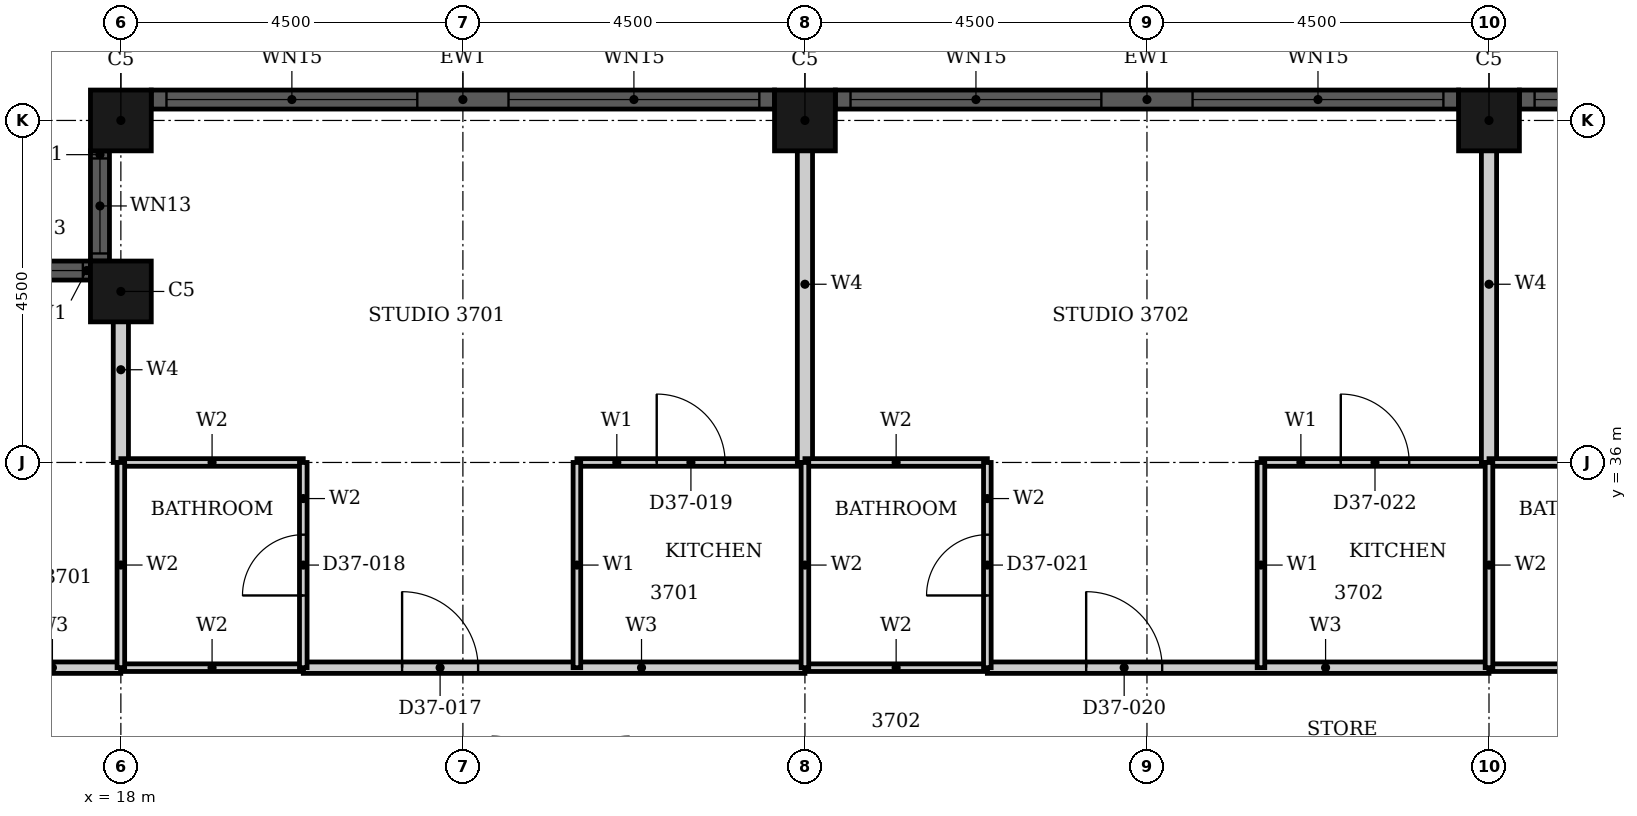
"""IFC4 building model, lengths in metres.
Left out: names, types, materials, properties, quantities, classifications, styles, units other than length and angle.
Written with IfcOpenShell. Run it as: python <this file> out.ifc"""

import sys

from ifc_helpers import new_model, si_unit, direction, frame, frame_2d, origin, origin_2d, place, context, subcontext, project, spatial, rectangle, hollow_rectangle, extrude, element, fill, save


model = new_model("IFC4")
c1 = context("Model", 3, precision=1e-05, world=origin(), true_north=direction((0.0, 1.0)))
c2 = subcontext(c1, "Body", "Model", "MODEL_VIEW")
j1 = project(units=[si_unit("LENGTHUNIT", "METRE"), si_unit("PLANEANGLEUNIT", "RADIAN")], contexts=[c1])
p1 = place(None, origin())
s1 = spatial("IfcSite", under=j1, at=p1, CompositionType="ELEMENT")
p2 = place(p1, origin())
s2 = spatial("IfcBuilding", under=s1, at=p2, CompositionType="ELEMENT")
p3 = place(p2, frame((0.0, 0.0, 150.6)))
s3 = spatial("IfcBuildingStorey", under=s2, at=p3, CompositionType="ELEMENT", Elevation=150.6)
for number, where, z_axis, x_axis in (
    (1, (36.0, 40.5, 0.0), (0.0, 0.0, 1.0), (1.0, 0.0, 0.0)),
    (2, (27.0, 40.5, 0.0), (0.0, 0.0, 1.0), (1.0, 0.0, 0.0)),
    (3, (18.0, 40.5, 0.0), (0.0, 0.0, 1.0), (1.0, 0.0, 0.0)),
    (4, (18.0, 38.25, 0.0), (0.0, 0.0, 1.0), (1.0, 0.0, 0.0)),
):
    element("IfcColumn", number, at=place(p3, frame(where, z_axis=z_axis, x_axis=x_axis)), inside=s3, PredefinedType="COLUMN", context=c2, shape_type="SweptSolid", body=[
        extrude(hollow_rectangle(XDim=0.8, YDim=0.8, WallThickness=0.025, at=origin_2d()), origin(), (0.0, 0.0, 1.0), 3.7),
    ])
p4 = place(p3, frame((44.6, 40.775, 0.0), z_axis=(0.0, 0.0, 1.0), x_axis=(-1.0, 0.0, 0.0)))
e5 = element("IfcWall", 5, at=p4, inside=s3, PredefinedType="SOLIDWALL", context=c2, shape_type="SweptSolid", body=[
    extrude(rectangle(XDim=8.2, YDim=0.25, at=frame_2d((4.1, 0.0))), origin(), (0.0, 0.0, 1.0), 3.7),
])
p5 = place(p4, frame((0.2, 0.0, 0.45)))
e6 = element("IfcOpeningElement", 6, at=p5, cuts=e5, PredefinedType="OPENING", context=c2, shape_type="SweptSolid", body=[
    extrude(rectangle(XDim=3.3, YDim=2.3, at=frame_2d((1.65, 1.15))), frame((0.0, 0.135, 0.0), z_axis=(0.0, -1.0, 0.0), x_axis=(1.0, 0.0, 0.0)), (0.0, 0.0, 1.0), 0.27),
])
p6 = place(p4, frame((4.7, 0.0, 0.45)))
e7 = element("IfcOpeningElement", 7, at=p6, cuts=e5, PredefinedType="OPENING", context=c2, shape_type="SweptSolid", body=[
    extrude(rectangle(XDim=3.3, YDim=2.3, at=frame_2d((1.65, 1.15))), frame((0.0, 0.135, 0.0), z_axis=(0.0, -1.0, 0.0), x_axis=(1.0, 0.0, 0.0)), (0.0, 0.0, 1.0), 0.27),
])
p7 = place(p3, frame((35.6, 40.775, 0.0), z_axis=(0.0, 0.0, 1.0), x_axis=(-1.0, 0.0, 0.0)))
e8 = element("IfcWall", 8, at=p7, inside=s3, PredefinedType="SOLIDWALL", context=c2, shape_type="SweptSolid", body=[
    extrude(rectangle(XDim=8.2, YDim=0.25, at=frame_2d((4.1, 0.0))), origin(), (0.0, 0.0, 1.0), 3.7),
])
p8 = place(p7, frame((0.2, 0.0, 0.45)))
e9 = element("IfcOpeningElement", 9, at=p8, cuts=e8, PredefinedType="OPENING", context=c2, shape_type="SweptSolid", body=[
    extrude(rectangle(XDim=3.3, YDim=2.3, at=frame_2d((1.65, 1.15))), frame((0.0, 0.135, 0.0), z_axis=(0.0, -1.0, 0.0), x_axis=(1.0, 0.0, 0.0)), (0.0, 0.0, 1.0), 0.27),
])
p9 = place(p7, frame((4.7, 0.0, 0.45)))
e10 = element("IfcOpeningElement", 10, at=p9, cuts=e8, PredefinedType="OPENING", context=c2, shape_type="SweptSolid", body=[
    extrude(rectangle(XDim=3.3, YDim=2.3, at=frame_2d((1.65, 1.15))), frame((0.0, 0.135, 0.0), z_axis=(0.0, -1.0, 0.0), x_axis=(1.0, 0.0, 0.0)), (0.0, 0.0, 1.0), 0.27),
])
p10 = place(p3, frame((26.6, 40.775, 0.0), z_axis=(0.0, 0.0, 1.0), x_axis=(-1.0, 0.0, 0.0)))
e11 = element("IfcWall", 11, at=p10, inside=s3, PredefinedType="SOLIDWALL", context=c2, shape_type="SweptSolid", body=[
    extrude(rectangle(XDim=8.2, YDim=0.25, at=frame_2d((4.1, 0.0))), origin(), (0.0, 0.0, 1.0), 3.7),
])
p11 = place(p10, frame((0.2, 0.0, 0.45)))
e12 = element("IfcOpeningElement", 12, at=p11, cuts=e11, PredefinedType="OPENING", context=c2, shape_type="SweptSolid", body=[
    extrude(rectangle(XDim=3.3, YDim=2.3, at=frame_2d((1.65, 1.15))), frame((0.0, 0.135, 0.0), z_axis=(0.0, -1.0, 0.0), x_axis=(1.0, 0.0, 0.0)), (0.0, 0.0, 1.0), 0.27),
])
p12 = place(p10, frame((4.7, 0.0, 0.45)))
e13 = element("IfcOpeningElement", 13, at=p12, cuts=e11, PredefinedType="OPENING", context=c2, shape_type="SweptSolid", body=[
    extrude(rectangle(XDim=3.3, YDim=2.3, at=frame_2d((1.65, 1.15))), frame((0.0, 0.135, 0.0), z_axis=(0.0, -1.0, 0.0), x_axis=(1.0, 0.0, 0.0)), (0.0, 0.0, 1.0), 0.27),
])
p13 = place(p3, frame((17.725, 40.1, 0.0), z_axis=(0.0, 0.0, 1.0), x_axis=(0.0, -1.0, 0.0)))
e14 = element("IfcWall", 14, at=p13, inside=s3, PredefinedType="SOLIDWALL", context=c2, shape_type="SweptSolid", body=[
    extrude(rectangle(XDim=1.45, YDim=0.25, at=frame_2d((0.725, 0.0))), origin(), (0.0, 0.0, 1.0), 3.7),
])
p14 = place(p13, frame((0.1, 0.0, 0.9)))
e15 = element("IfcOpeningElement", 15, at=p14, cuts=e14, PredefinedType="OPENING", context=c2, shape_type="SweptSolid", body=[
    extrude(rectangle(XDim=1.25, YDim=1.85, at=frame_2d((0.625, 0.925))), frame((0.0, 0.135, 0.0), z_axis=(0.0, -1.0, 0.0), x_axis=(1.0, 0.0, 0.0)), (0.0, 0.0, 1.0), 0.27),
])
p15 = place(p3, frame((17.6, 38.525, 0.0), z_axis=(0.0, 0.0, 1.0), x_axis=(-1.0, 0.0, 0.0)))
e16 = element("IfcWall", 16, at=p15, inside=s3, PredefinedType="SOLIDWALL", context=c2, shape_type="SweptSolid", body=[
    extrude(rectangle(XDim=1.45, YDim=0.25, at=frame_2d((0.725, 0.0))), origin(), (0.0, 0.0, 1.0), 3.7),
])
p16 = place(p15, frame((0.1, 0.0, 0.9)))
e17 = element("IfcOpeningElement", 17, at=p16, cuts=e16, PredefinedType="OPENING", context=c2, shape_type="SweptSolid", body=[
    extrude(rectangle(XDim=1.25, YDim=1.85, at=frame_2d((0.625, 0.925))), frame((0.0, 0.135, 0.0), z_axis=(0.0, -1.0, 0.0), x_axis=(1.0, 0.0, 0.0)), (0.0, 0.0, 1.0), 0.27),
])
p17 = place(p3, frame((20.4, 33.3, 0.0), z_axis=(0.0, 0.0, 1.0), x_axis=(1.0, 0.0, 0.0)))
e18 = element("IfcWall", 18, at=p17, inside=s3, PredefinedType="PARTITIONING", context=c2, shape_type="SweptSolid", body=[
    extrude(rectangle(XDim=6.6, YDim=0.15, at=frame_2d((3.3, 0.0))), origin(), (0.0, 0.0, 1.0), 3.4),
])
p18 = place(p17, frame((1.3, 0.0, 0.0)))
e19 = element("IfcOpeningElement", 19, at=p18, cuts=e18, PredefinedType="OPENING", context=c2, shape_type="SweptSolid", body=[
    extrude(rectangle(XDim=1.0, YDim=2.2, at=frame_2d((0.5, 1.1))), frame((0.0, 0.085, 0.0), z_axis=(0.0, -1.0, 0.0), x_axis=(1.0, 0.0, 0.0)), (0.0, 0.0, 1.0), 0.17),
])
p19 = place(p3, frame((29.4, 33.3, 0.0), z_axis=(0.0, 0.0, 1.0), x_axis=(1.0, 0.0, 0.0)))
e20 = element("IfcWall", 20, at=p19, inside=s3, PredefinedType="PARTITIONING", context=c2, shape_type="SweptSolid", body=[
    extrude(rectangle(XDim=6.6, YDim=0.15, at=frame_2d((3.3, 0.0))), origin(), (0.0, 0.0, 1.0), 3.4),
])
p20 = place(p19, frame((1.3, 0.0, 0.0)))
e21 = element("IfcOpeningElement", 21, at=p20, cuts=e20, PredefinedType="OPENING", context=c2, shape_type="SweptSolid", body=[
    extrude(rectangle(XDim=1.0, YDim=2.2, at=frame_2d((0.5, 1.1))), frame((0.0, 0.085, 0.0), z_axis=(0.0, -1.0, 0.0), x_axis=(1.0, 0.0, 0.0)), (0.0, 0.0, 1.0), 0.17),
])
p21 = place(p3, frame((16.2, 33.3, 0.0), z_axis=(0.0, 0.0, 1.0), x_axis=(1.0, 0.0, 0.0)))
e22 = element("IfcWall", 22, at=p21, inside=s3, PredefinedType="PARTITIONING", context=c2, shape_type="SweptSolid", body=[
    extrude(rectangle(XDim=1.799, YDim=0.15, at=frame_2d((0.899, 0.0))), origin(), (0.0, 0.0, 1.0), 3.4),
])
p22 = place(p3, frame((24.0, 36.0, 0.0), z_axis=(0.0, 0.0, 1.0), x_axis=(1.0, 0.0, 0.0)))
e23 = element("IfcWall", 23, at=p22, inside=s3, PredefinedType="PARTITIONING", context=c2, shape_type="SweptSolid", body=[
    extrude(rectangle(XDim=3.0, YDim=0.1, at=frame_2d((1.5, 0.0))), origin(), (0.0, 0.0, 1.0), 3.4),
])
p23 = place(p22, frame((1.05, 0.0, 0.0)))
e24 = element("IfcOpeningElement", 24, at=p23, cuts=e23, PredefinedType="OPENING", context=c2, shape_type="SweptSolid", body=[
    extrude(rectangle(XDim=0.9, YDim=2.1, at=frame_2d((0.45, 1.05))), frame((0.0, 0.06, 0.0), z_axis=(0.0, -1.0, 0.0), x_axis=(1.0, 0.0, 0.0)), (0.0, 0.0, 1.0), 0.12),
])
p24 = place(p3, frame((33.0, 36.0, 0.0), z_axis=(0.0, 0.0, 1.0), x_axis=(1.0, 0.0, 0.0)))
e25 = element("IfcWall", 25, at=p24, inside=s3, PredefinedType="PARTITIONING", context=c2, shape_type="SweptSolid", body=[
    extrude(rectangle(XDim=3.0, YDim=0.1, at=frame_2d((1.5, 0.0))), origin(), (0.0, 0.0, 1.0), 3.4),
])
p25 = place(p24, frame((1.05, 0.0, 0.0)))
e26 = element("IfcOpeningElement", 26, at=p25, cuts=e25, PredefinedType="OPENING", context=c2, shape_type="SweptSolid", body=[
    extrude(rectangle(XDim=0.9, YDim=2.1, at=frame_2d((0.45, 1.05))), frame((0.0, 0.06, 0.0), z_axis=(0.0, -1.0, 0.0), x_axis=(1.0, 0.0, 0.0)), (0.0, 0.0, 1.0), 0.12),
])
for number, where, z_axis, x_axis in (
    (27, (24.0, 33.3, 0.0), (0.0, 0.0, 1.0), (0.0, 1.0, 0.0)),
    (28, (33.0, 33.3, 0.0), (0.0, 0.0, 1.0), (0.0, 1.0, 0.0)),
):
    element("IfcWall", number, at=place(p3, frame(where, z_axis=z_axis, x_axis=x_axis)), inside=s3, PredefinedType="PARTITIONING", context=c2, shape_type="SweptSolid", body=[
        extrude(rectangle(XDim=2.7, YDim=0.1, at=frame_2d((1.35, 0.0))), origin(), (0.0, 0.0, 1.0), 3.4),
    ])
p26 = place(p3, frame((18.0, 36.0, 0.0), z_axis=(0.0, 0.0, 1.0), x_axis=(0.0, 1.0, 0.0)))
e29 = element("IfcWall", 29, at=p26, inside=s3, PredefinedType="PARTITIONING", context=c2, shape_type="SweptSolid", body=[
    extrude(rectangle(XDim=2.44, YDim=0.2, at=frame_2d((1.22, 0.0))), origin(), (0.0, 0.0, 1.0), 3.4),
])
for number, where, z_axis, x_axis in (
    (30, (27.0, 36.0, 0.0), (0.0, 0.0, 1.0), (0.0, 1.0, 0.0)),
    (31, (36.0, 36.0, 0.0), (0.0, 0.0, 1.0), (0.0, 1.0, 0.0)),
):
    element("IfcWall", number, at=place(p3, frame(where, z_axis=z_axis, x_axis=x_axis)), inside=s3, PredefinedType="PARTITIONING", context=c2, shape_type="SweptSolid", body=[
        extrude(rectangle(XDim=4.69, YDim=0.2, at=frame_2d((2.345, 0.0))), origin(), (0.0, 0.0, 1.0), 3.4),
    ])
for number, where, z_axis, x_axis in (
    (32, (18.0, 33.3, 0.0), (0.0, 0.0, 1.0), (1.0, 0.0, 0.0)),
    (33, (27.0, 33.3, 0.0), (0.0, 0.0, 1.0), (1.0, 0.0, 0.0)),
    (34, (36.0, 33.3, 0.0), (0.0, 0.0, 1.0), (1.0, 0.0, 0.0)),
    (35, (18.0, 36.0, 0.0), (0.0, 0.0, 1.0), (1.0, 0.0, 0.0)),
    (36, (27.0, 36.0, 0.0), (0.0, 0.0, 1.0), (1.0, 0.0, 0.0)),
    (37, (36.0, 36.0, 0.0), (0.0, 0.0, 1.0), (1.0, 0.0, 0.0)),
):
    element("IfcWall", number, at=place(p3, frame(where, z_axis=z_axis, x_axis=x_axis)), inside=s3, PredefinedType="PARTITIONING", context=c2, shape_type="SweptSolid", body=[
        extrude(rectangle(XDim=2.4, YDim=0.1, at=frame_2d((1.2, 0.0))), origin(), (0.0, 0.0, 1.0), 3.4),
    ])
p27 = place(p3, frame((18.0, 33.301, 0.0), z_axis=(0.0, 0.0, 1.0), x_axis=(0.0, 1.0, 0.0)))
e38 = element("IfcWall", 38, at=p27, inside=s3, PredefinedType="PARTITIONING", context=c2, shape_type="SweptSolid", body=[
    extrude(rectangle(XDim=2.699, YDim=0.1, at=frame_2d((1.35, 0.0))), origin(), (0.0, 0.0, 1.0), 3.4),
])
p28 = place(p3, frame((20.4, 33.3, 0.0), z_axis=(0.0, 0.0, 1.0), x_axis=(0.0, 1.0, 0.0)))
e39 = element("IfcWall", 39, at=p28, inside=s3, PredefinedType="PARTITIONING", context=c2, shape_type="SweptSolid", body=[
    extrude(rectangle(XDim=2.7, YDim=0.1, at=frame_2d((1.35, 0.0))), origin(), (0.0, 0.0, 1.0), 3.4),
])
p29 = place(p28, frame((0.95, 0.0, 0.0)))
e40 = element("IfcOpeningElement", 40, at=p29, cuts=e39, PredefinedType="OPENING", context=c2, shape_type="SweptSolid", body=[
    extrude(rectangle(XDim=0.8, YDim=2.1, at=frame_2d((0.4, 1.05))), frame((0.0, 0.06, 0.0), z_axis=(0.0, -1.0, 0.0), x_axis=(1.0, 0.0, 0.0)), (0.0, 0.0, 1.0), 0.12),
])
p30 = place(p3, frame((27.0, 33.3, 0.0), z_axis=(0.0, 0.0, 1.0), x_axis=(0.0, 1.0, 0.0)))
e41 = element("IfcWall", 41, at=p30, inside=s3, PredefinedType="PARTITIONING", context=c2, shape_type="SweptSolid", body=[
    extrude(rectangle(XDim=2.7, YDim=0.1, at=frame_2d((1.35, 0.0))), origin(), (0.0, 0.0, 1.0), 3.4),
])
p31 = place(p3, frame((29.4, 33.3, 0.0), z_axis=(0.0, 0.0, 1.0), x_axis=(0.0, 1.0, 0.0)))
e42 = element("IfcWall", 42, at=p31, inside=s3, PredefinedType="PARTITIONING", context=c2, shape_type="SweptSolid", body=[
    extrude(rectangle(XDim=2.7, YDim=0.1, at=frame_2d((1.35, 0.0))), origin(), (0.0, 0.0, 1.0), 3.4),
])
p32 = place(p31, frame((0.95, 0.0, 0.0)))
e43 = element("IfcOpeningElement", 43, at=p32, cuts=e42, PredefinedType="OPENING", context=c2, shape_type="SweptSolid", body=[
    extrude(rectangle(XDim=0.8, YDim=2.1, at=frame_2d((0.4, 1.05))), frame((0.0, 0.06, 0.0), z_axis=(0.0, -1.0, 0.0), x_axis=(1.0, 0.0, 0.0)), (0.0, 0.0, 1.0), 0.12),
])
p33 = place(p3, frame((36.0, 33.3, 0.0), z_axis=(0.0, 0.0, 1.0), x_axis=(0.0, 1.0, 0.0)))
e44 = element("IfcWall", 44, at=p33, inside=s3, PredefinedType="PARTITIONING", context=c2, shape_type="SweptSolid", body=[
    extrude(rectangle(XDim=2.7, YDim=0.1, at=frame_2d((1.35, 0.0))), origin(), (0.0, 0.0, 1.0), 3.4),
])
p34 = place(p6, origin())
e45 = element("IfcWindow", 45, at=p34, inside=s3, PartitioningType="SINGLE_PANEL", PredefinedType="WINDOW", context=c2, shape_type="SweptSolid", body=[
    extrude(rectangle(XDim=3.3, YDim=2.3, at=frame_2d((1.65, 1.15))), frame((0.0, 0.03, 0.0), z_axis=(0.0, -1.0, 0.0), x_axis=(1.0, 0.0, 0.0)), (0.0, 0.0, 1.0), 0.06),
])
fill(e7, e45)
p35 = place(p8, origin())
e46 = element("IfcWindow", 46, at=p35, inside=s3, PartitioningType="SINGLE_PANEL", PredefinedType="WINDOW", context=c2, shape_type="SweptSolid", body=[
    extrude(rectangle(XDim=3.3, YDim=2.3, at=frame_2d((1.65, 1.15))), frame((0.0, 0.03, 0.0), z_axis=(0.0, -1.0, 0.0), x_axis=(1.0, 0.0, 0.0)), (0.0, 0.0, 1.0), 0.06),
])
fill(e9, e46)
p36 = place(p9, origin())
e47 = element("IfcWindow", 47, at=p36, inside=s3, PartitioningType="SINGLE_PANEL", PredefinedType="WINDOW", context=c2, shape_type="SweptSolid", body=[
    extrude(rectangle(XDim=3.3, YDim=2.3, at=frame_2d((1.65, 1.15))), frame((0.0, 0.03, 0.0), z_axis=(0.0, -1.0, 0.0), x_axis=(1.0, 0.0, 0.0)), (0.0, 0.0, 1.0), 0.06),
])
fill(e10, e47)
p37 = place(p11, origin())
e48 = element("IfcWindow", 48, at=p37, inside=s3, PartitioningType="SINGLE_PANEL", PredefinedType="WINDOW", context=c2, shape_type="SweptSolid", body=[
    extrude(rectangle(XDim=3.3, YDim=2.3, at=frame_2d((1.65, 1.15))), frame((0.0, 0.03, 0.0), z_axis=(0.0, -1.0, 0.0), x_axis=(1.0, 0.0, 0.0)), (0.0, 0.0, 1.0), 0.06),
])
fill(e12, e48)
p38 = place(p12, origin())
e49 = element("IfcWindow", 49, at=p38, inside=s3, PartitioningType="SINGLE_PANEL", PredefinedType="WINDOW", context=c2, shape_type="SweptSolid", body=[
    extrude(rectangle(XDim=3.3, YDim=2.3, at=frame_2d((1.65, 1.15))), frame((0.0, 0.03, 0.0), z_axis=(0.0, -1.0, 0.0), x_axis=(1.0, 0.0, 0.0)), (0.0, 0.0, 1.0), 0.06),
])
fill(e13, e49)
p39 = place(p14, origin())
e50 = element("IfcWindow", 50, at=p39, inside=s3, PartitioningType="SINGLE_PANEL", PredefinedType="WINDOW", context=c2, shape_type="SweptSolid", body=[
    extrude(rectangle(XDim=1.25, YDim=1.85, at=frame_2d((0.625, 0.925))), frame((0.0, 0.03, 0.0), z_axis=(0.0, -1.0, 0.0), x_axis=(1.0, 0.0, 0.0)), (0.0, 0.0, 1.0), 0.06),
])
fill(e15, e50)
p40 = place(p16, origin())
e51 = element("IfcWindow", 51, at=p40, inside=s3, PartitioningType="SINGLE_PANEL", PredefinedType="WINDOW", context=c2, shape_type="SweptSolid", body=[
    extrude(rectangle(XDim=1.25, YDim=1.85, at=frame_2d((0.625, 0.925))), frame((0.0, 0.03, 0.0), z_axis=(0.0, -1.0, 0.0), x_axis=(1.0, 0.0, 0.0)), (0.0, 0.0, 1.0), 0.06),
])
fill(e17, e51)
p41 = place(p18, origin())
e52 = element("IfcDoor", 52, at=p41, inside=s3, OperationType="SINGLE_SWING_LEFT", PredefinedType="DOOR", context=c2, shape_type="SweptSolid", body=[
    extrude(rectangle(XDim=1.0, YDim=2.2, at=frame_2d((0.5, 1.1))), frame((0.0, 0.025, 0.0), z_axis=(0.0, -1.0, 0.0), x_axis=(1.0, 0.0, 0.0)), (0.0, 0.0, 1.0), 0.05),
])
fill(e19, e52)
p42 = place(p29, origin())
e53 = element("IfcDoor", 53, at=p42, inside=s3, OperationType="SINGLE_SWING_LEFT", PredefinedType="DOOR", context=c2, shape_type="SweptSolid", body=[
    extrude(rectangle(XDim=0.8, YDim=2.1, at=frame_2d((0.4, 1.05))), frame((0.0, 0.025, 0.0), z_axis=(0.0, -1.0, 0.0), x_axis=(1.0, 0.0, 0.0)), (0.0, 0.0, 1.0), 0.05),
])
fill(e40, e53)
p43 = place(p23, origin())
e54 = element("IfcDoor", 54, at=p43, inside=s3, OperationType="SINGLE_SWING_LEFT", PredefinedType="DOOR", context=c2, shape_type="SweptSolid", body=[
    extrude(rectangle(XDim=0.9, YDim=2.1, at=frame_2d((0.45, 1.05))), frame((0.0, 0.025, 0.0), z_axis=(0.0, -1.0, 0.0), x_axis=(1.0, 0.0, 0.0)), (0.0, 0.0, 1.0), 0.05),
])
fill(e24, e54)
p44 = place(p20, origin())
e55 = element("IfcDoor", 55, at=p44, inside=s3, OperationType="SINGLE_SWING_LEFT", PredefinedType="DOOR", context=c2, shape_type="SweptSolid", body=[
    extrude(rectangle(XDim=1.0, YDim=2.2, at=frame_2d((0.5, 1.1))), frame((0.0, 0.025, 0.0), z_axis=(0.0, -1.0, 0.0), x_axis=(1.0, 0.0, 0.0)), (0.0, 0.0, 1.0), 0.05),
])
fill(e21, e55)
p45 = place(p32, origin())
e56 = element("IfcDoor", 56, at=p45, inside=s3, OperationType="SINGLE_SWING_RIGHT", PredefinedType="DOOR", context=c2, shape_type="SweptSolid", body=[
    extrude(rectangle(XDim=0.8, YDim=2.1, at=frame_2d((0.4, 1.05))), frame((0.0, 0.025, 0.0), z_axis=(0.0, -1.0, 0.0), x_axis=(1.0, 0.0, 0.0)), (0.0, 0.0, 1.0), 0.05),
])
fill(e43, e56)
p46 = place(p25, origin())
e57 = element("IfcDoor", 57, at=p46, inside=s3, OperationType="SINGLE_SWING_LEFT", PredefinedType="DOOR", context=c2, shape_type="SweptSolid", body=[
    extrude(rectangle(XDim=0.9, YDim=2.1, at=frame_2d((0.45, 1.05))), frame((0.0, 0.025, 0.0), z_axis=(0.0, -1.0, 0.0), x_axis=(1.0, 0.0, 0.0)), (0.0, 0.0, 1.0), 0.05),
])
fill(e26, e57)
save(model, sys.argv[1])
